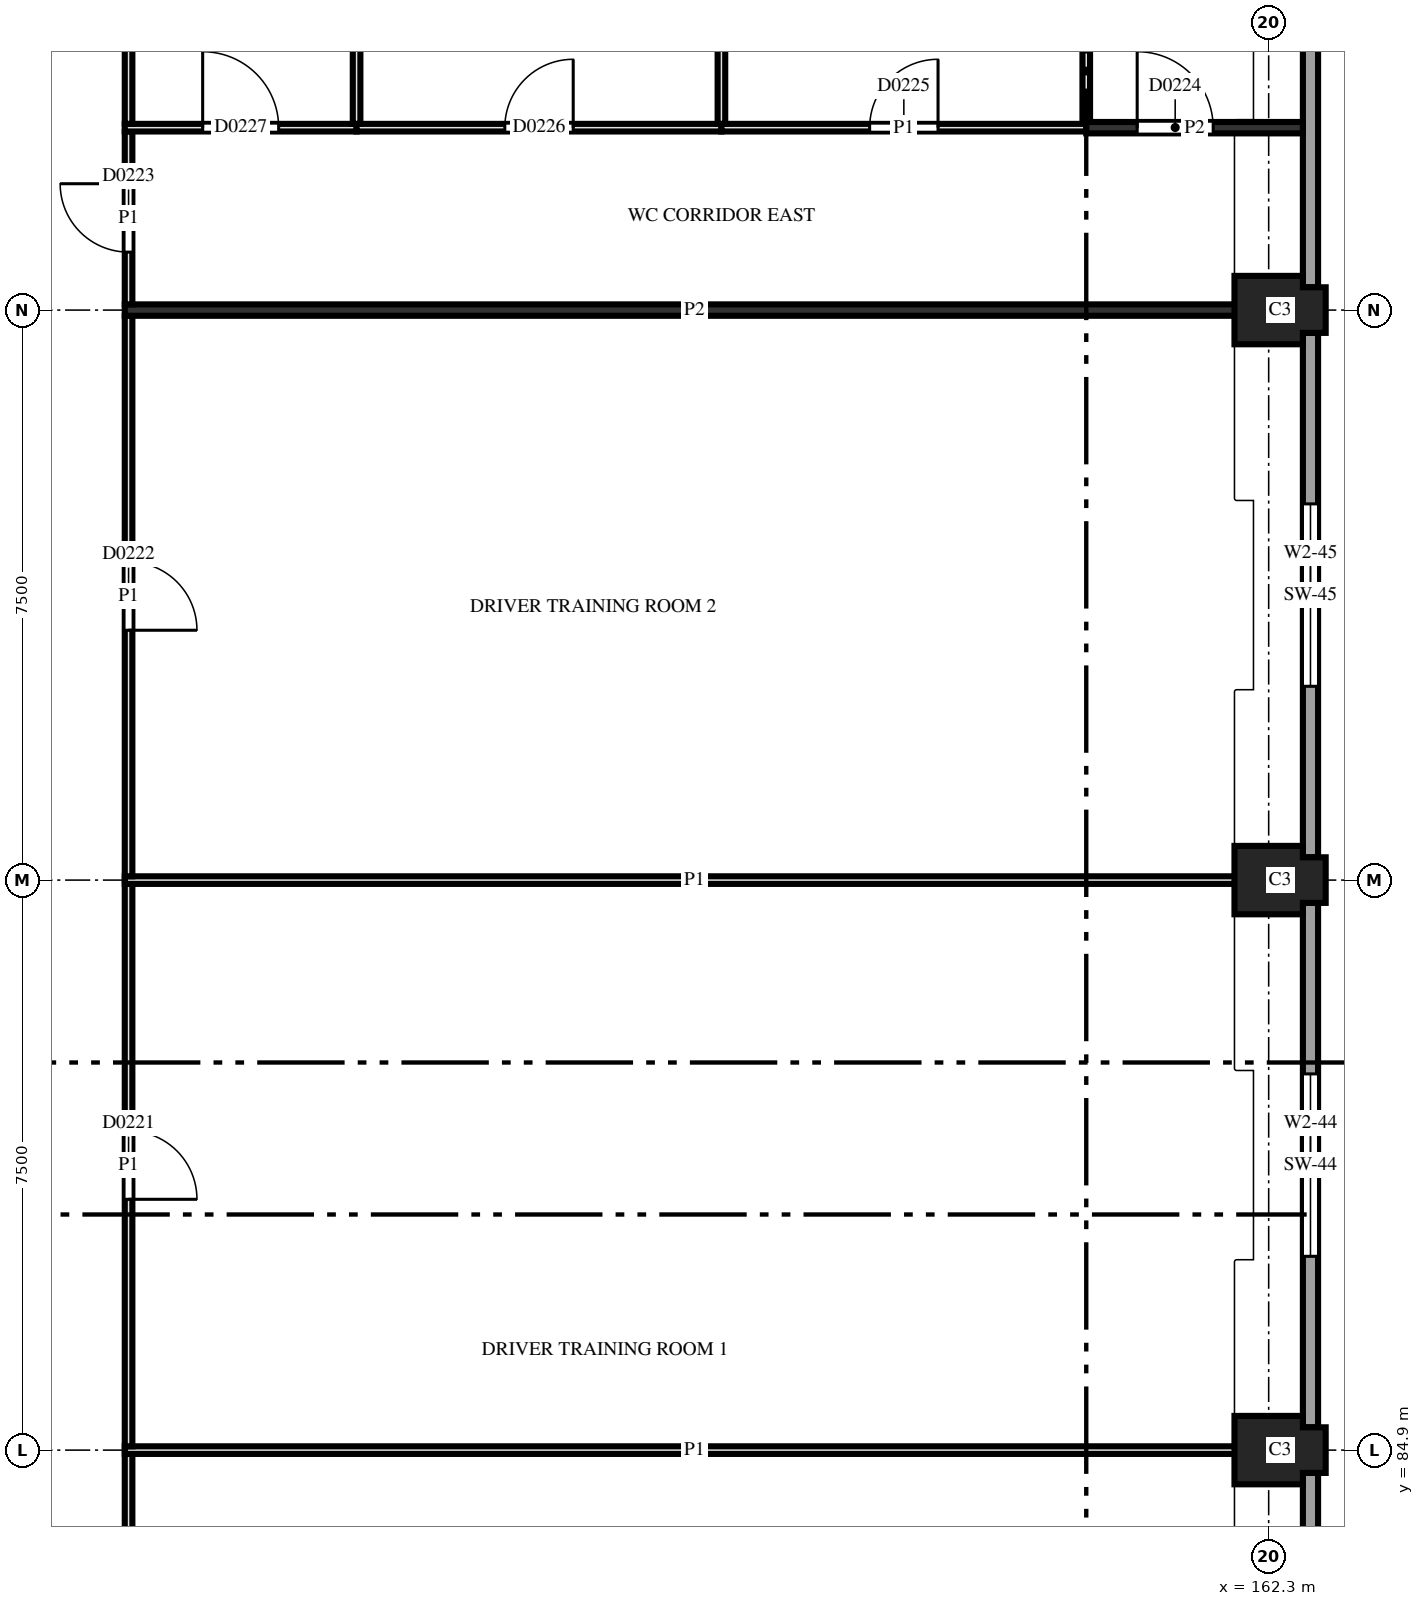
"""IFC4 building model, lengths in metres.
Left out: names, types, materials, properties, quantities, classifications, styles, units other than length and angle.
Written with IfcOpenShell. Run it as: python <this file> out.ifc"""

import sys

from ifc_helpers import new_model, si_unit, direction, frame, frame_2d, origin, place, context, subcontext, project, spatial, polyline, rectangle, outline, extrude, element, fill, save


model = new_model("IFC4")
c1 = context("Model", 3, precision=1e-05, world=origin(), true_north=direction((0.0, 1.0)))
c2 = subcontext(c1, "Body", "Model", "MODEL_VIEW")
j1 = project(units=[si_unit("LENGTHUNIT", "METRE"), si_unit("PLANEANGLEUNIT", "RADIAN")], contexts=[c1])
p1 = place(None, origin())
s1 = spatial("IfcSite", under=j1, at=p1, CompositionType="ELEMENT")
p2 = place(p1, origin())
s2 = spatial("IfcBuilding", under=s1, at=p2, CompositionType="ELEMENT")
p3 = place(p2, frame((0.0, 0.0, 8.2)))
s3 = spatial("IfcBuildingStorey", under=s2, at=p3, CompositionType="ELEMENT", Elevation=8.2)
for number, where, z_axis, x_axis in (
    (1, (162.3, 84.9, 0.0), (0.0, 0.0, 1.0), (1.0, 0.0, 0.0)),
    (2, (162.3, 92.4, 0.0), (0.0, 0.0, 1.0), (1.0, 0.0, 0.0)),
    (3, (162.3, 99.9, 0.0), (0.0, 0.0, 1.0), (1.0, 0.0, 0.0)),
):
    element("IfcColumn", number, at=place(p3, frame(where, z_axis=z_axis, x_axis=x_axis)), inside=s3, PredefinedType="COLUMN", context=c2, shape_type="SweptSolid", body=[
        extrude(outline(polyline([(-0.45, -0.45), (0.45, -0.45), (0.45, -0.3), (0.75, -0.3), (0.75, 0.3), (0.45, 0.3), (0.45, 0.45), (-0.45, 0.45), (-0.45, -0.45)])), origin(), (0.0, 0.0, 1.0), 3.7),
    ])
p4 = place(p3, frame((162.85, 77.7, 0.0), z_axis=(0.0, 0.0, 1.0), x_axis=(0.0, 1.0, 0.0)))
e4 = element("IfcWall", 4, at=p4, inside=s3, PredefinedType="SOLIDWALL", context=c2, shape_type="SweptSolid", body=[
    extrude(rectangle(XDim=6.9, YDim=0.2, at=frame_2d((3.45, 0.0))), origin(), (0.0, 0.0, 1.0), 2.3),
])
p5 = place(p4, frame((2.25, 0.0, 0.55)))
e5 = element("IfcOpeningElement", 5, at=p5, cuts=e4, PredefinedType="OPENING", context=c2, shape_type="SweptSolid", body=[
    extrude(rectangle(XDim=2.4, YDim=1.0, at=frame_2d((1.2, 0.5))), frame((0.0, 0.11, 0.0), z_axis=(0.0, -1.0, 0.0), x_axis=(1.0, 0.0, 0.0)), (0.0, 0.0, 1.0), 0.22),
])
p6 = place(p3, frame((162.85, 85.2, 0.0), z_axis=(0.0, 0.0, 1.0), x_axis=(0.0, 1.0, 0.0)))
e6 = element("IfcWall", 6, at=p6, inside=s3, PredefinedType="SOLIDWALL", context=c2, shape_type="SweptSolid", body=[
    extrude(rectangle(XDim=6.9, YDim=0.2, at=frame_2d((3.45, 0.0))), origin(), (0.0, 0.0, 1.0), 2.3),
])
p7 = place(p6, frame((2.25, 0.0, 0.55)))
e7 = element("IfcOpeningElement", 7, at=p7, cuts=e6, PredefinedType="OPENING", context=c2, shape_type="SweptSolid", body=[
    extrude(rectangle(XDim=2.4, YDim=1.0, at=frame_2d((1.2, 0.5))), frame((0.0, 0.11, 0.0), z_axis=(0.0, -1.0, 0.0), x_axis=(1.0, 0.0, 0.0)), (0.0, 0.0, 1.0), 0.22),
])
p8 = place(p3, frame((162.85, 92.7, 0.0), z_axis=(0.0, 0.0, 1.0), x_axis=(0.0, 1.0, 0.0)))
e8 = element("IfcWall", 8, at=p8, inside=s3, PredefinedType="SOLIDWALL", context=c2, shape_type="SweptSolid", body=[
    extrude(rectangle(XDim=6.9, YDim=0.2, at=frame_2d((3.45, 0.0))), origin(), (0.0, 0.0, 1.0), 2.3),
])
p9 = place(p8, frame((2.25, 0.0, 0.55)))
e9 = element("IfcOpeningElement", 9, at=p9, cuts=e8, PredefinedType="OPENING", context=c2, shape_type="SweptSolid", body=[
    extrude(rectangle(XDim=2.4, YDim=1.0, at=frame_2d((1.2, 0.5))), frame((0.0, 0.11, 0.0), z_axis=(0.0, -1.0, 0.0), x_axis=(1.0, 0.0, 0.0)), (0.0, 0.0, 1.0), 0.22),
])
p10 = place(p3, frame((162.85, 100.2, 0.0), z_axis=(0.0, 0.0, 1.0), x_axis=(0.0, 1.0, 0.0)))
e10 = element("IfcWall", 10, at=p10, inside=s3, PredefinedType="SOLIDWALL", context=c2, shape_type="SweptSolid", body=[
    extrude(rectangle(XDim=6.9, YDim=0.2, at=frame_2d((3.45, 0.0))), origin(), (0.0, 0.0, 1.0), 2.3),
])
p11 = place(p10, frame((3.4, 0.0, 0.55)))
e11 = element("IfcOpeningElement", 11, at=p11, cuts=e10, PredefinedType="OPENING", context=c2, shape_type="SweptSolid", body=[
    extrude(rectangle(XDim=2.4, YDim=1.0, at=frame_2d((1.2, 0.5))), frame((0.0, 0.11, 0.0), z_axis=(0.0, -1.0, 0.0), x_axis=(1.0, 0.0, 0.0)), (0.0, 0.0, 1.0), 0.22),
])
p12 = place(p3, frame((147.3, 84.85, 0.0), z_axis=(0.0, 0.0, 1.0), x_axis=(0.0, -1.0, 0.0)))
e12 = element("IfcWall", 12, at=p12, inside=s3, PredefinedType="PARTITIONING", context=c2, shape_type="SweptSolid", body=[
    extrude(rectangle(XDim=22.4, YDim=0.1, at=frame_2d((11.2, 0.0))), origin(), (0.0, 0.0, 1.0), 2.88),
])
p13 = place(p12, frame((10.75, 0.0, 0.0)))
e13 = element("IfcOpeningElement", 13, at=p13, cuts=e12, PredefinedType="OPENING", context=c2, shape_type="SweptSolid", body=[
    extrude(rectangle(XDim=0.9, YDim=2.1, at=frame_2d((0.45, 1.05))), frame((0.0, 0.06, 0.0), z_axis=(0.0, -1.0, 0.0), x_axis=(1.0, 0.0, 0.0)), (0.0, 0.0, 1.0), 0.12),
])
p14 = place(p3, frame((162.24, 84.9, 0.0), z_axis=(0.0, 0.0, 1.0), x_axis=(-1.0, 0.0, 0.0)))
e14 = element("IfcWall", 14, at=p14, inside=s3, PredefinedType="PARTITIONING", context=c2, shape_type="SweptSolid", body=[
    extrude(rectangle(XDim=14.99, YDim=0.1, at=frame_2d((7.495, 0.0))), origin(), (0.0, 0.0, 1.0), 2.88),
])
p15 = place(p3, frame((147.3, 92.35, 0.0), z_axis=(0.0, 0.0, 1.0), x_axis=(0.0, -1.0, 0.0)))
e15 = element("IfcWall", 15, at=p15, inside=s3, PredefinedType="PARTITIONING", context=c2, shape_type="SweptSolid", body=[
    extrude(rectangle(XDim=7.4, YDim=0.1, at=frame_2d((3.7, 0.0))), origin(), (0.0, 0.0, 1.0), 2.88),
])
p16 = place(p15, frame((3.25, 0.0, 0.0)))
e16 = element("IfcOpeningElement", 16, at=p16, cuts=e15, PredefinedType="OPENING", context=c2, shape_type="SweptSolid", body=[
    extrude(rectangle(XDim=0.9, YDim=2.1, at=frame_2d((0.45, 1.05))), frame((0.0, 0.06, 0.0), z_axis=(0.0, -1.0, 0.0), x_axis=(1.0, 0.0, 0.0)), (0.0, 0.0, 1.0), 0.12),
])
p17 = place(p3, frame((162.24, 92.4, 0.0), z_axis=(0.0, 0.0, 1.0), x_axis=(-1.0, 0.0, 0.0)))
e17 = element("IfcWall", 17, at=p17, inside=s3, PredefinedType="PARTITIONING", context=c2, shape_type="SweptSolid", body=[
    extrude(rectangle(XDim=14.99, YDim=0.1, at=frame_2d((7.495, 0.0))), origin(), (0.0, 0.0, 1.0), 2.88),
])
p18 = place(p3, frame((147.3, 99.825, 0.0), z_axis=(0.0, 0.0, 1.0), x_axis=(0.0, -1.0, 0.0)))
e18 = element("IfcWall", 18, at=p18, inside=s3, PredefinedType="PARTITIONING", context=c2, shape_type="SweptSolid", body=[
    extrude(rectangle(XDim=7.375, YDim=0.1, at=frame_2d((3.688, 0.0))), origin(), (0.0, 0.0, 1.0), 2.88),
])
p19 = place(p18, frame((3.238, 0.0, 0.0)))
e19 = element("IfcOpeningElement", 19, at=p19, cuts=e18, PredefinedType="OPENING", context=c2, shape_type="SweptSolid", body=[
    extrude(rectangle(XDim=0.9, YDim=2.1, at=frame_2d((0.45, 1.05))), frame((0.0, 0.06, 0.0), z_axis=(0.0, -1.0, 0.0), x_axis=(1.0, 0.0, 0.0)), (0.0, 0.0, 1.0), 0.12),
])
p20 = place(p3, frame((162.24, 99.9, 0.0), z_axis=(0.0, 0.0, 1.0), x_axis=(-1.0, 0.0, 0.0)))
e20 = element("IfcWall", 20, at=p20, inside=s3, PredefinedType="PARTITIONING", context=c2, shape_type="SweptSolid", body=[
    extrude(rectangle(XDim=14.99, YDim=0.15, at=frame_2d((7.495, 0.0))), origin(), (0.0, 0.0, 1.0), 2.88),
])
p21 = place(p3, frame((147.3, 102.25, 0.0), z_axis=(0.0, 0.0, 1.0), x_axis=(0.0, -1.0, 0.0)))
e21 = element("IfcWall", 21, at=p21, inside=s3, PredefinedType="PARTITIONING", context=c2, shape_type="SweptSolid", body=[
    extrude(rectangle(XDim=2.275, YDim=0.1, at=frame_2d((1.137, 0.0))), origin(), (0.0, 0.0, 1.0), 2.88),
])
p22 = place(p21, frame((0.688, 0.0, 0.0)))
e22 = element("IfcOpeningElement", 22, at=p22, cuts=e21, PredefinedType="OPENING", context=c2, shape_type="SweptSolid", body=[
    extrude(rectangle(XDim=0.9, YDim=2.1, at=frame_2d((0.45, 1.05))), frame((0.0, 0.06, 0.0), z_axis=(0.0, -1.0, 0.0), x_axis=(1.0, 0.0, 0.0)), (0.0, 0.0, 1.0), 0.12),
])
p23 = place(p3, frame((150.3, 102.3, 0.0), z_axis=(0.0, 0.0, 1.0), x_axis=(-1.0, 0.0, 0.0)))
e23 = element("IfcWall", 23, at=p23, inside=s3, PredefinedType="PARTITIONING", context=c2, shape_type="SweptSolid", body=[
    extrude(rectangle(XDim=3.05, YDim=0.1, at=frame_2d((1.525, 0.0))), origin(), (0.0, 0.0, 1.0), 2.88),
])
p24 = place(p23, frame((1.025, 0.0, 0.0)))
e24 = element("IfcOpeningElement", 24, at=p24, cuts=e23, PredefinedType="OPENING", context=c2, shape_type="SweptSolid", body=[
    extrude(rectangle(XDim=1.0, YDim=2.1, at=frame_2d((0.5, 1.05))), frame((0.0, 0.06, 0.0), z_axis=(0.0, -1.0, 0.0), x_axis=(1.0, 0.0, 0.0)), (0.0, 0.0, 1.0), 0.12),
])
p25 = place(p3, frame((155.1, 102.3, 0.0), z_axis=(0.0, 0.0, 1.0), x_axis=(-1.0, 0.0, 0.0)))
e25 = element("IfcWall", 25, at=p25, inside=s3, PredefinedType="PARTITIONING", context=c2, shape_type="SweptSolid", body=[
    extrude(rectangle(XDim=4.8, YDim=0.1, at=frame_2d((2.4, 0.0))), origin(), (0.0, 0.0, 1.0), 2.88),
])
p26 = place(p25, frame((1.95, 0.0, 0.0)))
e26 = element("IfcOpeningElement", 26, at=p26, cuts=e25, PredefinedType="OPENING", context=c2, shape_type="SweptSolid", body=[
    extrude(rectangle(XDim=0.9, YDim=2.1, at=frame_2d((0.45, 1.05))), frame((0.0, 0.06, 0.0), z_axis=(0.0, -1.0, 0.0), x_axis=(1.0, 0.0, 0.0)), (0.0, 0.0, 1.0), 0.12),
])
p27 = place(p3, frame((159.9, 102.3, 0.0), z_axis=(0.0, 0.0, 1.0), x_axis=(-1.0, 0.0, 0.0)))
e27 = element("IfcWall", 27, at=p27, inside=s3, PredefinedType="PARTITIONING", context=c2, shape_type="SweptSolid", body=[
    extrude(rectangle(XDim=4.8, YDim=0.1, at=frame_2d((2.4, 0.0))), origin(), (0.0, 0.0, 1.0), 2.88),
])
p28 = place(p27, frame((1.95, 0.0, 0.0)))
e28 = element("IfcOpeningElement", 28, at=p28, cuts=e27, PredefinedType="OPENING", context=c2, shape_type="SweptSolid", body=[
    extrude(rectangle(XDim=0.9, YDim=2.1, at=frame_2d((0.45, 1.05))), frame((0.0, 0.06, 0.0), z_axis=(0.0, -1.0, 0.0), x_axis=(1.0, 0.0, 0.0)), (0.0, 0.0, 1.0), 0.12),
])
p29 = place(p3, frame((162.75, 102.3, 0.0), z_axis=(0.0, 0.0, 1.0), x_axis=(-1.0, 0.0, 0.0)))
e29 = element("IfcWall", 29, at=p29, inside=s3, PredefinedType="PARTITIONING", context=c2, shape_type="SweptSolid", body=[
    extrude(rectangle(XDim=2.85, YDim=0.15, at=frame_2d((1.425, 0.0))), origin(), (0.0, 0.0, 1.0), 2.88),
])
p30 = place(p29, frame((1.18, 0.0, 0.0)))
e30 = element("IfcOpeningElement", 30, at=p30, cuts=e29, PredefinedType="OPENING", context=c2, shape_type="SweptSolid", body=[
    extrude(rectangle(XDim=1.0, YDim=2.1, at=frame_2d((0.5, 1.05))), frame((0.0, 0.085, 0.0), z_axis=(0.0, -1.0, 0.0), x_axis=(1.0, 0.0, 0.0)), (0.0, 0.0, 1.0), 0.17),
])
for number, where, z_axis, x_axis in (
    (31, (147.3, 107.35, 0.0), (0.0, 0.0, 1.0), (0.0, -1.0, 0.0)),
    (32, (150.3, 107.35, 0.0), (0.0, 0.0, 1.0), (0.0, -1.0, 0.0)),
):
    element("IfcWall", number, at=place(p3, frame(where, z_axis=z_axis, x_axis=x_axis)), inside=s3, PredefinedType="PARTITIONING", context=c2, shape_type="SweptSolid", body=[
        extrude(rectangle(XDim=5.0, YDim=0.1, at=frame_2d((2.5, 0.0))), origin(), (0.0, 0.0, 1.0), 2.88),
    ])
p31 = place(p3, frame((155.1, 107.3, 0.0), z_axis=(0.0, 0.0, 1.0), x_axis=(0.0, -1.0, 0.0)))
e33 = element("IfcWall", 33, at=p31, inside=s3, PredefinedType="PARTITIONING", context=c2, shape_type="SweptSolid", body=[
    extrude(rectangle(XDim=4.95, YDim=0.1, at=frame_2d((2.475, 0.0))), origin(), (0.0, 0.0, 1.0), 2.88),
])
p32 = place(p3, frame((159.9, 107.35, 0.0), z_axis=(0.0, 0.0, 1.0), x_axis=(0.0, -1.0, 0.0)))
e34 = element("IfcWall", 34, at=p32, inside=s3, PredefinedType="PARTITIONING", context=c2, shape_type="SweptSolid", body=[
    extrude(rectangle(XDim=4.975, YDim=0.1, at=frame_2d((2.488, 0.0))), origin(), (0.0, 0.0, 1.0), 2.88),
])
p33 = place(p7, origin())
e35 = element("IfcWindow", 35, at=p33, inside=s3, PartitioningType="SINGLE_PANEL", PredefinedType="WINDOW", context=c2, shape_type="SweptSolid", body=[
    extrude(rectangle(XDim=2.4, YDim=1.0, at=frame_2d((1.2, 0.5))), frame((0.0, 0.03, 0.0), z_axis=(0.0, -1.0, 0.0), x_axis=(1.0, 0.0, 0.0)), (0.0, 0.0, 1.0), 0.06),
])
fill(e7, e35)
p34 = place(p9, origin())
e36 = element("IfcWindow", 36, at=p34, inside=s3, PartitioningType="SINGLE_PANEL", PredefinedType="WINDOW", context=c2, shape_type="SweptSolid", body=[
    extrude(rectangle(XDim=2.4, YDim=1.0, at=frame_2d((1.2, 0.5))), frame((0.0, 0.03, 0.0), z_axis=(0.0, -1.0, 0.0), x_axis=(1.0, 0.0, 0.0)), (0.0, 0.0, 1.0), 0.06),
])
fill(e9, e36)
p35 = place(p16, origin())
e37 = element("IfcDoor", 37, at=p35, inside=s3, OperationType="SINGLE_SWING_LEFT", PredefinedType="DOOR", context=c2, shape_type="SweptSolid", body=[
    extrude(rectangle(XDim=0.9, YDim=2.1, at=frame_2d((0.45, 1.05))), frame((0.0, 0.025, 0.0), z_axis=(0.0, -1.0, 0.0), x_axis=(1.0, 0.0, 0.0)), (0.0, 0.0, 1.0), 0.05),
])
fill(e16, e37)
p36 = place(p19, origin())
e38 = element("IfcDoor", 38, at=p36, inside=s3, OperationType="SINGLE_SWING_LEFT", PredefinedType="DOOR", context=c2, shape_type="SweptSolid", body=[
    extrude(rectangle(XDim=0.9, YDim=2.1, at=frame_2d((0.45, 1.05))), frame((0.0, 0.025, 0.0), z_axis=(0.0, -1.0, 0.0), x_axis=(1.0, 0.0, 0.0)), (0.0, 0.0, 1.0), 0.05),
])
fill(e19, e38)
p37 = place(p22, origin())
e39 = element("IfcDoor", 39, at=p37, inside=s3, OperationType="SINGLE_SWING_LEFT", PredefinedType="DOOR", context=c2, shape_type="SweptSolid", body=[
    extrude(rectangle(XDim=0.9, YDim=2.1, at=frame_2d((0.45, 1.05))), frame((0.0, 0.025, 0.0), z_axis=(0.0, -1.0, 0.0), x_axis=(1.0, 0.0, 0.0)), (0.0, 0.0, 1.0), 0.05),
])
fill(e22, e39)
p38 = place(p30, origin())
e40 = element("IfcDoor", 40, at=p38, inside=s3, OperationType="SINGLE_SWING_RIGHT", PredefinedType="DOOR", context=c2, shape_type="SweptSolid", body=[
    extrude(rectangle(XDim=1.0, YDim=2.1, at=frame_2d((0.5, 1.05))), frame((0.0, 0.025, 0.0), z_axis=(0.0, -1.0, 0.0), x_axis=(1.0, 0.0, 0.0)), (0.0, 0.0, 1.0), 0.05),
])
fill(e30, e40)
p39 = place(p28, origin())
e41 = element("IfcDoor", 41, at=p39, inside=s3, OperationType="SINGLE_SWING_LEFT", PredefinedType="DOOR", context=c2, shape_type="SweptSolid", body=[
    extrude(rectangle(XDim=0.9, YDim=2.1, at=frame_2d((0.45, 1.05))), frame((0.0, 0.025, 0.0), z_axis=(0.0, -1.0, 0.0), x_axis=(1.0, 0.0, 0.0)), (0.0, 0.0, 1.0), 0.05),
])
fill(e28, e41)
p40 = place(p26, origin())
e42 = element("IfcDoor", 42, at=p40, inside=s3, OperationType="SINGLE_SWING_LEFT", PredefinedType="DOOR", context=c2, shape_type="SweptSolid", body=[
    extrude(rectangle(XDim=0.9, YDim=2.1, at=frame_2d((0.45, 1.05))), frame((0.0, 0.025, 0.0), z_axis=(0.0, -1.0, 0.0), x_axis=(1.0, 0.0, 0.0)), (0.0, 0.0, 1.0), 0.05),
])
fill(e26, e42)
p41 = place(p24, origin())
e43 = element("IfcDoor", 43, at=p41, inside=s3, OperationType="SINGLE_SWING_RIGHT", PredefinedType="DOOR", context=c2, shape_type="SweptSolid", body=[
    extrude(rectangle(XDim=1.0, YDim=2.1, at=frame_2d((0.5, 1.05))), frame((0.0, 0.025, 0.0), z_axis=(0.0, -1.0, 0.0), x_axis=(1.0, 0.0, 0.0)), (0.0, 0.0, 1.0), 0.05),
])
fill(e24, e43)
save(model, sys.argv[1])
